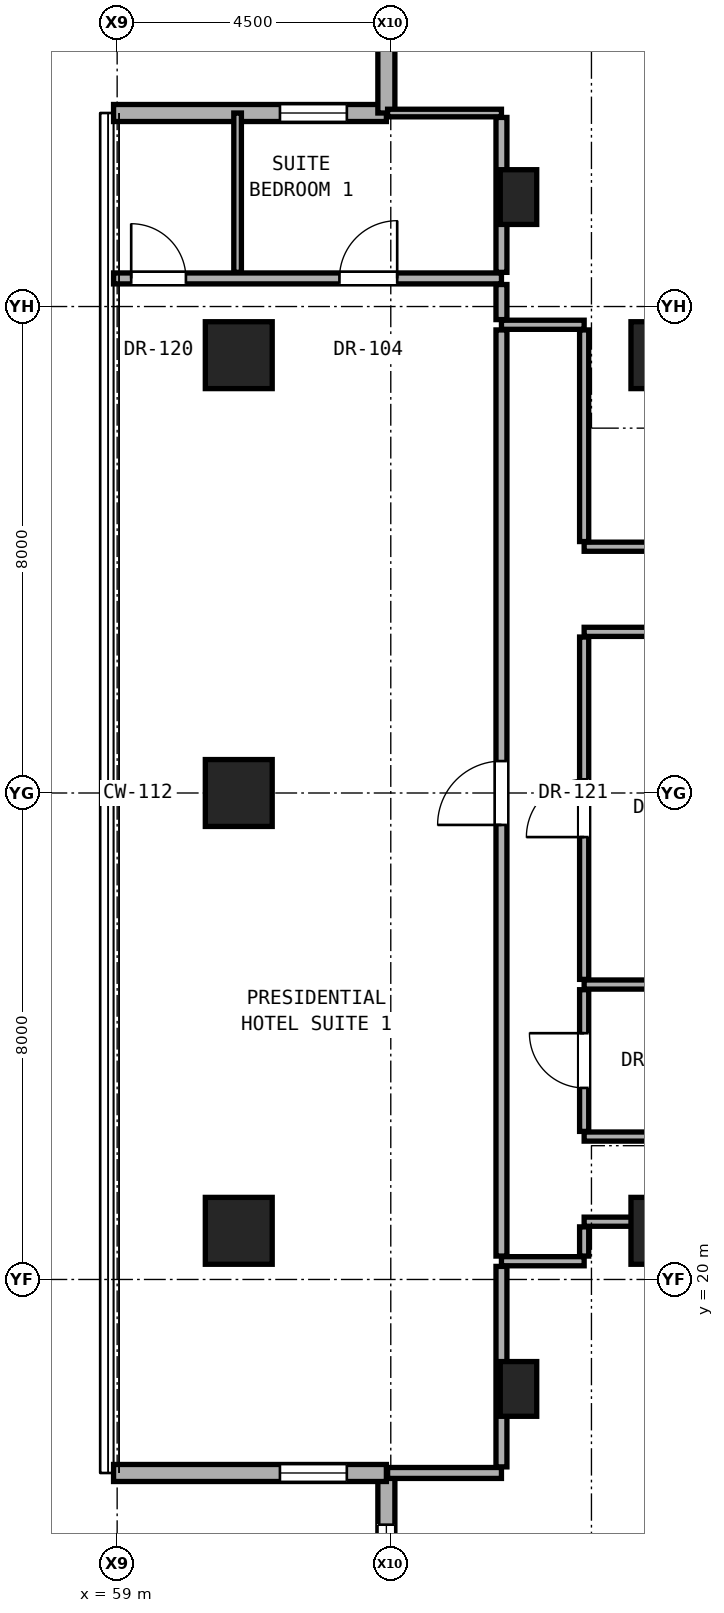
"""IFC4 building model, lengths in metres.
Left out: names, types, materials, properties, quantities, classifications, styles, units other than length and angle.
Written with IfcOpenShell. Run it as: python <this file> out.ifc"""

import sys

from ifc_helpers import new_model, si_unit, direction, frame, frame_2d, origin, origin_2d, place, context, subcontext, project, spatial, rectangle, hollow_rectangle, extrude, element, fill, save


model = new_model("IFC4")
c1 = context("Model", 3, precision=1e-05, world=origin(), true_north=direction((0.0, 1.0)))
c2 = subcontext(c1, "Body", "Model", "MODEL_VIEW")
j1 = project(units=[si_unit("LENGTHUNIT", "METRE"), si_unit("PLANEANGLEUNIT", "RADIAN")], contexts=[c1])
p1 = place(None, origin())
s1 = spatial("IfcSite", under=j1, at=p1, CompositionType="ELEMENT")
p2 = place(p1, origin())
s2 = spatial("IfcBuilding", under=s1, at=p2, CompositionType="ELEMENT")
p3 = place(p2, frame((0.0, 0.0, 128.0)))
s3 = spatial("IfcBuildingStorey", under=s2, at=p3, CompositionType="ELEMENT", Elevation=128.0)
for number, where, z_axis, x_axis in (
    (1, (68.0, 20.8, 0.0), (0.0, 0.0, 1.0), (1.0, 0.0, 0.0)),
    (2, (68.0, 35.2, 0.0), (0.0, 0.0, 1.0), (1.0, 0.0, 0.0)),
):
    element("IfcColumn", number, at=place(p3, frame(where, z_axis=z_axis, x_axis=x_axis)), inside=s3, PredefinedType="COLUMN", context=c2, shape_type="SweptSolid", body=[
        extrude(rectangle(XDim=1.1, YDim=1.1, at=origin_2d()), origin(), (0.0, 0.0, 1.0), 3.3),
    ])
for number, where, z_axis, x_axis in (
    (3, (61.0, 20.8, 0.0), (0.0, 0.0, 1.0), (1.0, 0.0, 0.0)),
    (4, (61.0, 28.0, 0.0), (0.0, 0.0, 1.0), (1.0, 0.0, 0.0)),
    (5, (61.0, 35.2, 0.0), (0.0, 0.0, 1.0), (1.0, 0.0, 0.0)),
):
    element("IfcColumn", number, at=place(p3, frame(where, z_axis=z_axis, x_axis=x_axis)), inside=s3, PredefinedType="COLUMN", context=c2, shape_type="SweptSolid", body=[
        extrude(hollow_rectangle(XDim=1.1, YDim=1.1, WallThickness=0.06, at=origin_2d()), origin(), (0.0, 0.0, 1.0), 3.3),
    ])
for number, where, z_axis, x_axis in (
    (6, (65.6, 18.2, 0.0), (0.0, 0.0, 1.0), (1.0, 0.0, 0.0)),
    (7, (65.6, 37.8, 0.0), (0.0, 0.0, 1.0), (1.0, 0.0, 0.0)),
):
    element("IfcColumn", number, at=place(p3, frame(where, z_axis=z_axis, x_axis=x_axis)), inside=s3, PredefinedType="PILASTER", context=c2, shape_type="SweptSolid", body=[
        extrude(rectangle(XDim=0.6, YDim=0.9, at=origin_2d()), origin(), (0.0, 0.0, 1.0), 3.3),
    ])
p4 = place(p3, frame((63.427, 16.818, 0.0), z_axis=(0.0, 0.0, 1.0), x_axis=(0.0, -1.0, 0.0)))
e8 = element("IfcWall", 8, at=p4, inside=s3, PredefinedType="SOLIDWALL", context=c2, shape_type="SweptSolid", body=[
    extrude(rectangle(XDim=4.487, YDim=0.28, at=frame_2d((2.243, 0.0))), origin(), (0.0, 0.0, 1.0), 3.06),
])
p5 = place(p4, frame((0.85, 0.0, 0.81)))
e9 = element("IfcOpeningElement", 9, at=p5, cuts=e8, PredefinedType="OPENING", context=c2, shape_type="SweptSolid", body=[
    extrude(rectangle(XDim=1.8, YDim=2.1, at=frame_2d((0.9, 1.05))), frame((0.0, 0.15, 0.0), z_axis=(0.0, -1.0, 0.0), x_axis=(1.0, 0.0, 0.0)), (0.0, 0.0, 1.0), 0.3),
])
p6 = place(p3, frame((58.941, 16.818, 0.0), z_axis=(0.0, 0.0, 1.0), x_axis=(1.0, 0.0, 0.0)))
e10 = element("IfcWall", 10, at=p6, inside=s3, PredefinedType="SOLIDWALL", context=c2, shape_type="SweptSolid", body=[
    extrude(rectangle(XDim=4.487, YDim=0.28, at=frame_2d((2.243, 0.0))), origin(), (0.0, 0.0, 1.0), 3.06),
])
p7 = place(p6, frame((2.736, 0.0, 0.85)))
e11 = element("IfcOpeningElement", 11, at=p7, cuts=e10, PredefinedType="OPENING", context=c2, shape_type="SweptSolid", body=[
    extrude(rectangle(XDim=1.1, YDim=2.0, at=frame_2d((0.55, 1.0))), frame((0.0, 0.15, 0.0), z_axis=(0.0, -1.0, 0.0), x_axis=(1.0, 0.0, 0.0)), (0.0, 0.0, 1.0), 0.3),
])
p8 = place(p3, frame((63.427, 39.182, 0.0), z_axis=(0.0, 0.0, 1.0), x_axis=(-1.0, 0.0, 0.0)))
e12 = element("IfcWall", 12, at=p8, inside=s3, PredefinedType="SOLIDWALL", context=c2, shape_type="SweptSolid", body=[
    extrude(rectangle(XDim=4.487, YDim=0.28, at=frame_2d((2.243, 0.0))), origin(), (0.0, 0.0, 1.0), 3.06),
])
p9 = place(p8, frame((0.65, 0.0, 0.85)))
e13 = element("IfcOpeningElement", 13, at=p9, cuts=e12, PredefinedType="OPENING", context=c2, shape_type="SweptSolid", body=[
    extrude(rectangle(XDim=1.1, YDim=2.0, at=frame_2d((0.55, 1.0))), frame((0.0, 0.15, 0.0), z_axis=(0.0, -1.0, 0.0), x_axis=(1.0, 0.0, 0.0)), (0.0, 0.0, 1.0), 0.3),
])
p10 = place(p3, frame((63.427, 43.669, 0.0), z_axis=(0.0, 0.0, 1.0), x_axis=(0.0, -1.0, 0.0)))
e14 = element("IfcWall", 14, at=p10, inside=s3, PredefinedType="SOLIDWALL", context=c2, shape_type="SweptSolid", body=[
    extrude(rectangle(XDim=4.487, YDim=0.28, at=frame_2d((2.243, 0.0))), origin(), (0.0, 0.0, 1.0), 3.06),
])
p11 = place(p3, frame((63.448, 16.818, 0.0), z_axis=(0.0, 0.0, 1.0), x_axis=(1.0, 0.0, 0.0)))
e15 = element("IfcWall", 15, at=p11, inside=s3, PredefinedType="PARTITIONING", context=c2, shape_type="SweptSolid", body=[
    extrude(rectangle(XDim=1.873, YDim=0.18, at=frame_2d((0.936, 0.0))), origin(), (0.0, 0.0, 1.0), 3.08),
])
p12 = place(p3, frame((65.32, 20.3, 0.0), z_axis=(0.0, 0.0, 1.0), x_axis=(1.0, 0.0, 0.0)))
e16 = element("IfcWall", 16, at=p12, inside=s3, PredefinedType="PARTITIONING", context=c2, shape_type="SweptSolid", body=[
    extrude(rectangle(XDim=1.36, YDim=0.15, at=frame_2d((0.68, 0.0))), origin(), (0.0, 0.0, 1.0), 3.08),
])
p13 = place(p3, frame((66.68, 20.95, 0.0), z_axis=(0.0, 0.0, 1.0), x_axis=(1.0, 0.0, 0.0)))
e17 = element("IfcWall", 17, at=p13, inside=s3, PredefinedType="PARTITIONING", context=c2, shape_type="SweptSolid", body=[
    extrude(rectangle(XDim=1.05, YDim=0.15, at=frame_2d((0.525, 0.0))), origin(), (0.0, 0.0, 1.0), 2.472),
])
p14 = place(p3, frame((66.68, 22.35, 0.0), z_axis=(0.0, 0.0, 1.0), x_axis=(1.0, 0.0, 0.0)))
e18 = element("IfcWall", 18, at=p14, inside=s3, PredefinedType="PARTITIONING", context=c2, shape_type="SweptSolid", body=[
    extrude(rectangle(XDim=19.5, YDim=0.15, at=frame_2d((9.75, 0.0))), origin(), (0.0, 0.0, 1.0), 2.216),
])
p15 = place(p14, frame((8.802, 0.0, 0.0)))
e19 = element("IfcOpeningElement", 19, at=p15, cuts=e18, PredefinedType="OPENING", context=c2, shape_type="SweptSolid", body=[
    extrude(rectangle(XDim=1.05, YDim=2.2, at=frame_2d((0.525, 1.1))), frame((0.0, 0.085, 0.0), z_axis=(0.0, -1.0, 0.0), x_axis=(1.0, 0.0, 0.0)), (0.0, 0.0, 1.0), 0.17),
])
p16 = place(p14, frame((15.846, 0.0, 0.0)))
e20 = element("IfcOpeningElement", 20, at=p16, cuts=e18, PredefinedType="OPENING", context=c2, shape_type="SweptSolid", body=[
    extrude(rectangle(XDim=1.05, YDim=2.2, at=frame_2d((0.525, 1.1))), frame((0.0, 0.085, 0.0), z_axis=(0.0, -1.0, 0.0), x_axis=(1.0, 0.0, 0.0)), (0.0, 0.0, 1.0), 0.17),
])
p17 = place(p3, frame((66.68, 24.85, 0.0), z_axis=(0.0, 0.0, 1.0), x_axis=(1.0, 0.0, 0.0)))
e21 = element("IfcWall", 21, at=p17, inside=s3, PredefinedType="PARTITIONING", context=c2, shape_type="SweptSolid", body=[
    extrude(rectangle(XDim=3.07, YDim=0.15, at=frame_2d((1.535, 0.0))), origin(), (0.0, 0.0, 1.0), 2.216),
])
p18 = place(p3, frame((66.68, 30.65, 0.0), z_axis=(0.0, 0.0, 1.0), x_axis=(1.0, 0.0, 0.0)))
e22 = element("IfcWall", 22, at=p18, inside=s3, PredefinedType="PARTITIONING", context=c2, shape_type="SweptSolid", body=[
    extrude(rectangle(XDim=19.5, YDim=0.15, at=frame_2d((9.75, 0.0))), origin(), (0.0, 0.0, 1.0), 2.216),
])
p19 = place(p18, frame((3.745, 0.0, 0.0)))
e23 = element("IfcOpeningElement", 23, at=p19, cuts=e22, PredefinedType="OPENING", context=c2, shape_type="SweptSolid", body=[
    extrude(rectangle(XDim=0.95, YDim=2.15, at=frame_2d((0.475, 1.075))), frame((0.0, 0.085, 0.0), z_axis=(0.0, -1.0, 0.0), x_axis=(1.0, 0.0, 0.0)), (0.0, 0.0, 1.0), 0.17),
])
p20 = place(p18, frame((8.802, 0.0, 0.0)))
e24 = element("IfcOpeningElement", 24, at=p20, cuts=e22, PredefinedType="OPENING", context=c2, shape_type="SweptSolid", body=[
    extrude(rectangle(XDim=1.05, YDim=2.2, at=frame_2d((0.525, 1.1))), frame((0.0, 0.085, 0.0), z_axis=(0.0, -1.0, 0.0), x_axis=(1.0, 0.0, 0.0)), (0.0, 0.0, 1.0), 0.17),
])
p21 = place(p18, frame((15.846, 0.0, 0.0)))
e25 = element("IfcOpeningElement", 25, at=p21, cuts=e22, PredefinedType="OPENING", context=c2, shape_type="SweptSolid", body=[
    extrude(rectangle(XDim=1.05, YDim=2.2, at=frame_2d((0.525, 1.1))), frame((0.0, 0.085, 0.0), z_axis=(0.0, -1.0, 0.0), x_axis=(1.0, 0.0, 0.0)), (0.0, 0.0, 1.0), 0.17),
])
p22 = place(p3, frame((66.68, 32.05, 0.0), z_axis=(0.0, 0.0, 1.0), x_axis=(1.0, 0.0, 0.0)))
e26 = element("IfcWall", 26, at=p22, inside=s3, PredefinedType="PARTITIONING", context=c2, shape_type="SweptSolid", body=[
    extrude(rectangle(XDim=2.12, YDim=0.15, at=frame_2d((1.06, 0.0))), origin(), (0.0, 0.0, 1.0), 2.216),
])
p23 = place(p3, frame((65.32, 35.7, 0.0), z_axis=(0.0, 0.0, 1.0), x_axis=(1.0, 0.0, 0.0)))
e27 = element("IfcWall", 27, at=p23, inside=s3, PredefinedType="PARTITIONING", context=c2, shape_type="SweptSolid", body=[
    extrude(rectangle(XDim=1.36, YDim=0.15, at=frame_2d((0.68, 0.0))), origin(), (0.0, 0.0, 1.0), 3.08),
])
p24 = place(p3, frame((58.941, 36.462, 0.0), z_axis=(0.0, 0.0, 1.0), x_axis=(1.0, 0.0, 0.0)))
e28 = element("IfcWall", 28, at=p24, inside=s3, PredefinedType="PARTITIONING", context=c2, shape_type="SweptSolid", body=[
    extrude(rectangle(XDim=6.379, YDim=0.18, at=frame_2d((3.189, 0.0))), origin(), (0.0, 0.0, 1.0), 2.523),
])
p25 = place(p24, frame((3.715, 0.0, 0.0)))
e29 = element("IfcOpeningElement", 29, at=p25, cuts=e28, PredefinedType="OPENING", context=c2, shape_type="SweptSolid", body=[
    extrude(rectangle(XDim=0.95, YDim=2.15, at=frame_2d((0.475, 1.075))), frame((0.0, 0.1, 0.0), z_axis=(0.0, -1.0, 0.0), x_axis=(1.0, 0.0, 0.0)), (0.0, 0.0, 1.0), 0.2),
])
p26 = place(p24, frame((0.29, 0.0, 0.0)))
e30 = element("IfcOpeningElement", 30, at=p26, cuts=e28, PredefinedType="OPENING", context=c2, shape_type="SweptSolid", body=[
    extrude(rectangle(XDim=0.9, YDim=2.1, at=frame_2d((0.45, 1.05))), frame((0.0, 0.1, 0.0), z_axis=(0.0, -1.0, 0.0), x_axis=(1.0, 0.0, 0.0)), (0.0, 0.0, 1.0), 0.2),
])
p27 = place(p3, frame((63.448, 39.182, 0.0), z_axis=(0.0, 0.0, 1.0), x_axis=(1.0, 0.0, 0.0)))
e31 = element("IfcWall", 31, at=p27, inside=s3, PredefinedType="PARTITIONING", context=c2, shape_type="SweptSolid", body=[
    extrude(rectangle(XDim=1.873, YDim=0.125, at=frame_2d((0.936, 0.0))), origin(), (0.0, 0.0, 1.0), 3.08),
])
p28 = place(p3, frame((60.981, 36.562, 0.0), z_axis=(0.0, 0.0, 1.0), x_axis=(0.0, 1.0, 0.0)))
e32 = element("IfcWall", 32, at=p28, inside=s3, PredefinedType="PARTITIONING", context=c2, shape_type="SweptSolid", body=[
    extrude(rectangle(XDim=2.62, YDim=0.125, at=frame_2d((1.31, 0.0))), origin(), (0.0, 0.0, 1.0), 3.08),
])
p29 = place(p3, frame((65.32, 16.918, 0.0), z_axis=(0.0, 0.0, 1.0), x_axis=(0.0, 1.0, 0.0)))
e33 = element("IfcWall", 33, at=p29, inside=s3, PredefinedType="PARTITIONING", context=c2, shape_type="SweptSolid", body=[
    extrude(rectangle(XDim=3.297, YDim=0.18, at=frame_2d((1.648, 0.0))), origin(), (0.0, 0.0, 1.0), 2.523),
])
p30 = place(p3, frame((65.32, 20.385, 0.0), z_axis=(0.0, 0.0, 1.0), x_axis=(0.0, 1.0, 0.0)))
e34 = element("IfcWall", 34, at=p30, inside=s3, PredefinedType="PARTITIONING", context=c2, shape_type="SweptSolid", body=[
    extrude(rectangle(XDim=15.23, YDim=0.18, at=frame_2d((7.615, 0.0))), origin(), (0.0, 0.0, 1.0), 2.376),
])
p31 = place(p30, frame((7.09, 0.0, 0.0)))
e35 = element("IfcOpeningElement", 35, at=p31, cuts=e34, PredefinedType="OPENING", context=c2, shape_type="SweptSolid", body=[
    extrude(rectangle(XDim=1.05, YDim=2.2, at=frame_2d((0.525, 1.1))), frame((0.0, 0.1, 0.0), z_axis=(0.0, -1.0, 0.0), x_axis=(1.0, 0.0, 0.0)), (0.0, 0.0, 1.0), 0.2),
])
p32 = place(p3, frame((65.32, 35.785, 0.0), z_axis=(0.0, 0.0, 1.0), x_axis=(0.0, 1.0, 0.0)))
e36 = element("IfcWall", 36, at=p32, inside=s3, PredefinedType="PARTITIONING", context=c2, shape_type="SweptSolid", body=[
    extrude(rectangle(XDim=0.577, YDim=0.18, at=frame_2d((0.289, 0.0))), origin(), (0.0, 0.0, 1.0), 3.08),
])
p33 = place(p3, frame((65.32, 36.562, 0.0), z_axis=(0.0, 0.0, 1.0), x_axis=(0.0, 1.0, 0.0)))
e37 = element("IfcWall", 37, at=p33, inside=s3, PredefinedType="PARTITIONING", context=c2, shape_type="SweptSolid", body=[
    extrude(rectangle(XDim=2.548, YDim=0.18, at=frame_2d((1.274, 0.0))), origin(), (0.0, 0.0, 1.0), 2.523),
])
p34 = place(p3, frame((66.68, 20.385, 0.0), z_axis=(0.0, 0.0, 1.0), x_axis=(0.0, 1.0, 0.0)))
e38 = element("IfcWall", 38, at=p34, inside=s3, PredefinedType="PARTITIONING", context=c2, shape_type="SweptSolid", body=[
    extrude(rectangle(XDim=0.48, YDim=0.15, at=frame_2d((0.24, 0.0))), origin(), (0.0, 0.0, 1.0), 2.472),
])
p35 = place(p3, frame((66.68, 22.435, 0.0), z_axis=(0.0, 0.0, 1.0), x_axis=(0.0, 1.0, 0.0)))
e39 = element("IfcWall", 39, at=p35, inside=s3, PredefinedType="PARTITIONING", context=c2, shape_type="SweptSolid", body=[
    extrude(rectangle(XDim=2.33, YDim=0.15, at=frame_2d((1.165, 0.0))), origin(), (0.0, 0.0, 1.0), 3.08),
])
p36 = place(p35, frame((0.715, 0.0, 0.0)))
e40 = element("IfcOpeningElement", 40, at=p36, cuts=e39, PredefinedType="OPENING", context=c2, shape_type="SweptSolid", body=[
    extrude(rectangle(XDim=0.9, YDim=2.1, at=frame_2d((0.45, 1.05))), frame((0.0, 0.085, 0.0), z_axis=(0.0, -1.0, 0.0), x_axis=(1.0, 0.0, 0.0)), (0.0, 0.0, 1.0), 0.17),
])
p37 = place(p3, frame((66.68, 24.935, 0.0), z_axis=(0.0, 0.0, 1.0), x_axis=(0.0, 1.0, 0.0)))
e41 = element("IfcWall", 41, at=p37, inside=s3, PredefinedType="PARTITIONING", context=c2, shape_type="SweptSolid", body=[
    extrude(rectangle(XDim=5.63, YDim=0.15, at=frame_2d((2.815, 0.0))), origin(), (0.0, 0.0, 1.0), 2.376),
])
p38 = place(p37, frame((2.34, 0.0, 0.0)))
e42 = element("IfcOpeningElement", 42, at=p38, cuts=e41, PredefinedType="OPENING", context=c2, shape_type="SweptSolid", body=[
    extrude(rectangle(XDim=0.95, YDim=2.15, at=frame_2d((0.475, 1.075))), frame((0.0, 0.085, 0.0), z_axis=(0.0, -1.0, 0.0), x_axis=(1.0, 0.0, 0.0)), (0.0, 0.0, 1.0), 0.17),
])
p39 = place(p3, frame((66.68, 32.135, 0.0), z_axis=(0.0, 0.0, 1.0), x_axis=(0.0, 1.0, 0.0)))
e43 = element("IfcWall", 43, at=p39, inside=s3, PredefinedType="PARTITIONING", context=c2, shape_type="SweptSolid", body=[
    extrude(rectangle(XDim=3.48, YDim=0.15, at=frame_2d((1.74, 0.0))), origin(), (0.0, 0.0, 1.0), 2.472),
])
p40 = place(p5, origin())
e44 = element("IfcWindow", 44, at=p40, inside=s3, PartitioningType="SINGLE_PANEL", PredefinedType="WINDOW", context=c2, shape_type="SweptSolid", body=[
    extrude(rectangle(XDim=1.8, YDim=2.1, at=frame_2d((0.9, 1.05))), frame((0.0, 0.03, 0.0), z_axis=(0.0, -1.0, 0.0), x_axis=(1.0, 0.0, 0.0)), (0.0, 0.0, 1.0), 0.06),
])
fill(e9, e44)
p41 = place(p7, origin())
e45 = element("IfcWindow", 45, at=p41, inside=s3, PartitioningType="SINGLE_PANEL", PredefinedType="WINDOW", context=c2, shape_type="SweptSolid", body=[
    extrude(rectangle(XDim=1.1, YDim=2.0, at=frame_2d((0.55, 1.0))), frame((0.0, 0.03, 0.0), z_axis=(0.0, -1.0, 0.0), x_axis=(1.0, 0.0, 0.0)), (0.0, 0.0, 1.0), 0.06),
])
fill(e11, e45)
p42 = place(p9, origin())
e46 = element("IfcWindow", 46, at=p42, inside=s3, PartitioningType="SINGLE_PANEL", PredefinedType="WINDOW", context=c2, shape_type="SweptSolid", body=[
    extrude(rectangle(XDim=1.1, YDim=2.0, at=frame_2d((0.55, 1.0))), frame((0.0, 0.03, 0.0), z_axis=(0.0, -1.0, 0.0), x_axis=(1.0, 0.0, 0.0)), (0.0, 0.0, 1.0), 0.06),
])
fill(e13, e46)
p43 = place(p36, origin())
e47 = element("IfcDoor", 47, at=p43, inside=s3, OperationType="SINGLE_SWING_RIGHT", PredefinedType="DOOR", context=c2, shape_type="SweptSolid", body=[
    extrude(rectangle(XDim=0.9, YDim=2.1, at=frame_2d((0.45, 1.05))), frame((0.0, 0.025, 0.0), z_axis=(0.0, -1.0, 0.0), x_axis=(1.0, 0.0, 0.0)), (0.0, 0.0, 1.0), 0.05),
])
fill(e40, e47)
p44 = place(p31, origin())
e48 = element("IfcDoor", 48, at=p44, inside=s3, OperationType="SINGLE_SWING_LEFT", PredefinedType="DOOR", context=c2, shape_type="SweptSolid", body=[
    extrude(rectangle(XDim=1.05, YDim=2.2, at=frame_2d((0.525, 1.1))), frame((0.0, 0.025, 0.0), z_axis=(0.0, -1.0, 0.0), x_axis=(1.0, 0.0, 0.0)), (0.0, 0.0, 1.0), 0.05),
])
fill(e35, e48)
p45 = place(p25, origin())
e49 = element("IfcDoor", 49, at=p45, inside=s3, OperationType="SINGLE_SWING_RIGHT", PredefinedType="DOOR", context=c2, shape_type="SweptSolid", body=[
    extrude(rectangle(XDim=0.95, YDim=2.15, at=frame_2d((0.475, 1.075))), frame((0.0, 0.025, 0.0), z_axis=(0.0, -1.0, 0.0), x_axis=(1.0, 0.0, 0.0)), (0.0, 0.0, 1.0), 0.05),
])
fill(e29, e49)
p46 = place(p26, origin())
e50 = element("IfcDoor", 50, at=p46, inside=s3, OperationType="SINGLE_SWING_LEFT", PredefinedType="DOOR", context=c2, shape_type="SweptSolid", body=[
    extrude(rectangle(XDim=0.9, YDim=2.1, at=frame_2d((0.45, 1.05))), frame((0.0, 0.025, 0.0), z_axis=(0.0, -1.0, 0.0), x_axis=(1.0, 0.0, 0.0)), (0.0, 0.0, 1.0), 0.05),
])
fill(e30, e50)
p47 = place(p38, origin())
e51 = element("IfcDoor", 51, at=p47, inside=s3, OperationType="SINGLE_SWING_LEFT", PredefinedType="DOOR", context=c2, shape_type="SweptSolid", body=[
    extrude(rectangle(XDim=0.95, YDim=2.15, at=frame_2d((0.475, 1.075))), frame((0.0, 0.025, 0.0), z_axis=(0.0, -1.0, 0.0), x_axis=(1.0, 0.0, 0.0)), (0.0, 0.0, 1.0), 0.05),
])
fill(e42, e51)
save(model, sys.argv[1])
